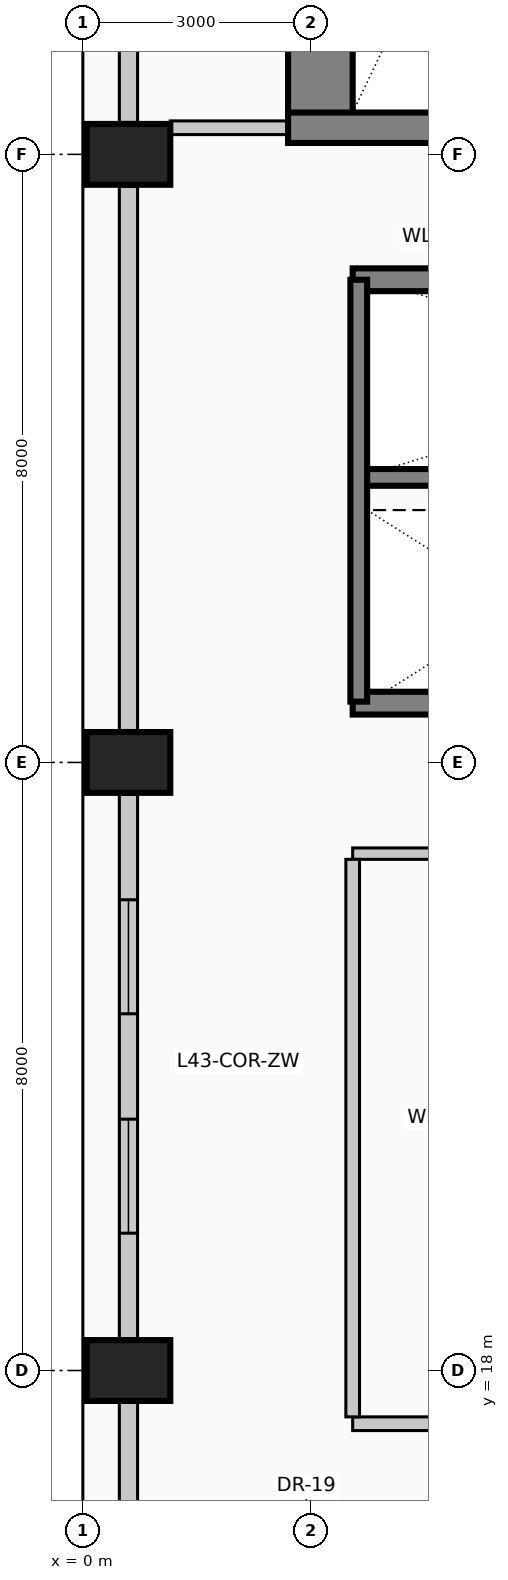
"""IFC4 building model, lengths in metres.
Left out: names, types, materials, properties, quantities, classifications, styles, units other than length and angle.
Written with IfcOpenShell. Run it as: python <this file> out.ifc"""

import sys

from ifc_helpers import new_model, si_unit, direction, frame, frame_2d, origin, origin_2d, place, context, subcontext, project, spatial, rectangle, extrude, element, fill, save


model = new_model("IFC4")
c1 = context("Model", 3, precision=1e-05, world=origin(), true_north=direction((0.0, 1.0)))
c2 = subcontext(c1, "Body", "Model", "MODEL_VIEW")
j1 = project(units=[si_unit("LENGTHUNIT", "METRE"), si_unit("PLANEANGLEUNIT", "RADIAN")], contexts=[c1])
p1 = place(None, origin())
s1 = spatial("IfcSite", under=j1, at=p1, CompositionType="ELEMENT")
p2 = place(p1, origin())
s2 = spatial("IfcBuilding", under=s1, at=p2, CompositionType="ELEMENT")
p3 = place(p2, frame((0.0, 0.0, 178.6)))
s3 = spatial("IfcBuildingStorey", under=s2, at=p3, CompositionType="ELEMENT", Elevation=178.6)
p4 = place(p3, frame((3.125, 34.15, 0.0), z_axis=(0.0, 0.0, 1.0), x_axis=(0.0, 1.0, 0.0)))
e1 = element("IfcWall", 1, at=p4, inside=s3, PredefinedType="SHEAR", context=c2, shape_type="SweptSolid", body=[
    extrude(rectangle(XDim=9.13, YDim=0.85, at=frame_2d((4.565, 0.0))), origin(), (0.0, 0.0, 1.0), 4.0),
])
p5 = place(p3, frame((2.7, 34.35, 0.0), z_axis=(0.0, 0.0, 1.0), x_axis=(1.0, 0.0, 0.0)))
e2 = element("IfcWall", 2, at=p5, inside=s3, PredefinedType="SHEAR", context=c2, shape_type="SweptSolid", body=[
    extrude(rectangle(XDim=5.01, YDim=0.4, at=frame_2d((2.505, 0.0))), origin(), (0.0, 0.0, 1.0), 4.0),
])
p6 = place(p5, frame((2.4, 0.0, 0.0)))
e3 = element("IfcOpeningElement", 3, at=p6, cuts=e2, PredefinedType="OPENING", context=c2, shape_type="SweptSolid", body=[
    extrude(rectangle(XDim=1.15, YDim=2.2, at=frame_2d((0.575, 1.1))), frame((0.0, 0.21, 0.0), z_axis=(0.0, -1.0, 0.0), x_axis=(1.0, 0.0, 0.0)), (0.0, 0.0, 1.0), 0.42),
])
for number, where, z_axis, x_axis in (
    (4, (0.6, 18.0, 0.0), (0.0, 0.0, 1.0), (0.0, 1.0, 0.0)),
    (5, (0.6, 26.0, 0.0), (0.0, 0.0, 1.0), (0.0, 1.0, 0.0)),
    (6, (0.6, 34.0, 0.0), (0.0, 0.0, 1.0), (0.0, 1.0, 0.0)),
):
    element("IfcColumn", number, at=place(p3, frame(where, z_axis=z_axis, x_axis=x_axis)), inside=s3, PredefinedType="COLUMN", context=c2, shape_type="SweptSolid", body=[
        extrude(rectangle(XDim=0.8, YDim=1.1, at=origin_2d()), origin(), (0.0, 0.0, 1.0), 4.0),
    ])
p7 = place(p3, frame((0.6, 10.42, 0.0), z_axis=(0.0, 0.0, 1.0), x_axis=(0.0, 1.0, 0.0)))
e7 = element("IfcWall", 7, at=p7, inside=s3, PredefinedType="SOLIDWALL", context=c2, shape_type="SweptSolid", body=[
    extrude(rectangle(XDim=7.16, YDim=0.24, at=frame_2d((3.58, 0.0))), origin(), (0.0, 0.0, 1.0), 3.0),
])
p8 = place(p7, frame((1.387, 0.0, 0.42)))
e8 = element("IfcOpeningElement", 8, at=p8, cuts=e7, PredefinedType="OPENING", context=c2, shape_type="SweptSolid", body=[
    extrude(rectangle(XDim=1.5, YDim=2.2, at=frame_2d((0.75, 1.1))), frame((0.0, 0.13, 0.0), z_axis=(0.0, -1.0, 0.0), x_axis=(1.0, 0.0, 0.0)), (0.0, 0.0, 1.0), 0.26),
])
p9 = place(p3, frame((0.6, 18.42, 0.0), z_axis=(0.0, 0.0, 1.0), x_axis=(0.0, 1.0, 0.0)))
e9 = element("IfcWall", 9, at=p9, inside=s3, PredefinedType="SOLIDWALL", context=c2, shape_type="SweptSolid", body=[
    extrude(rectangle(XDim=7.16, YDim=0.24, at=frame_2d((3.58, 0.0))), origin(), (0.0, 0.0, 1.0), 3.0),
])
p10 = place(p9, frame((1.387, 0.0, 0.42)))
e10 = element("IfcOpeningElement", 10, at=p10, cuts=e9, PredefinedType="OPENING", context=c2, shape_type="SweptSolid", body=[
    extrude(rectangle(XDim=1.5, YDim=2.2, at=frame_2d((0.75, 1.1))), frame((0.0, 0.13, 0.0), z_axis=(0.0, -1.0, 0.0), x_axis=(1.0, 0.0, 0.0)), (0.0, 0.0, 1.0), 0.26),
])
p11 = place(p9, frame((4.273, 0.0, 0.42)))
e11 = element("IfcOpeningElement", 11, at=p11, cuts=e9, PredefinedType="OPENING", context=c2, shape_type="SweptSolid", body=[
    extrude(rectangle(XDim=1.5, YDim=2.2, at=frame_2d((0.75, 1.1))), frame((0.0, 0.13, 0.0), z_axis=(0.0, -1.0, 0.0), x_axis=(1.0, 0.0, 0.0)), (0.0, 0.0, 1.0), 0.26),
])
p12 = place(p3, frame((0.6, 26.42, 0.0), z_axis=(0.0, 0.0, 1.0), x_axis=(0.0, 1.0, 0.0)))
e12 = element("IfcWall", 12, at=p12, inside=s3, PredefinedType="SOLIDWALL", context=c2, shape_type="SweptSolid", body=[
    extrude(rectangle(XDim=7.16, YDim=0.24, at=frame_2d((3.58, 0.0))), origin(), (0.0, 0.0, 1.0), 3.0),
])
p13 = place(p3, frame((0.6, 34.42, 0.0), z_axis=(0.0, 0.0, 1.0), x_axis=(0.0, 1.0, 0.0)))
e13 = element("IfcWall", 13, at=p13, inside=s3, PredefinedType="SOLIDWALL", context=c2, shape_type="SweptSolid", body=[
    extrude(rectangle(XDim=7.56, YDim=0.24, at=frame_2d((3.78, 0.0))), origin(), (0.0, 0.0, 1.0), 3.0),
])
for number, where, z_axis, x_axis in (
    (14, (3.55, 32.35, 0.0), (0.0, 0.0, 1.0), (1.0, 0.0, 0.0)),
    (15, (5.65, 26.78, 0.0), (0.0, 0.0, 1.0), (-1.0, 0.0, 0.0)),
):
    element("IfcWall", number, at=place(p3, frame(where, z_axis=z_axis, x_axis=x_axis)), inside=s3, PredefinedType="SOLIDWALL", context=c2, shape_type="SweptSolid", body=[
        extrude(rectangle(XDim=2.1, YDim=0.3, at=frame_2d((1.05, 0.0))), origin(), (0.0, 0.0, 1.0), 4.0),
    ])
p14 = place(p3, frame((3.55, 29.75, 0.0), z_axis=(0.0, 0.0, 1.0), x_axis=(1.0, 0.0, 0.0)))
e16 = element("IfcWall", 16, at=p14, inside=s3, PredefinedType="SOLIDWALL", context=c2, shape_type="SweptSolid", body=[
    extrude(rectangle(XDim=8.65, YDim=0.22, at=frame_2d((4.325, 0.0))), origin(), (0.0, 0.0, 1.0), 4.0),
])
p15 = place(p3, frame((3.63, 26.8, 0.0), z_axis=(0.0, 0.0, 1.0), x_axis=(0.0, 1.0, 0.0)))
e17 = element("IfcWall", 17, at=p15, inside=s3, PredefinedType="SOLIDWALL", context=c2, shape_type="SweptSolid", body=[
    extrude(rectangle(XDim=5.55, YDim=0.22, at=frame_2d((2.775, 0.0))), origin(), (0.0, 0.0, 1.0), 4.0),
])
p16 = place(p3, frame((3.55, 17.3, 0.0), z_axis=(0.0, 0.0, 1.0), x_axis=(1.0, 0.0, 0.0)))
e18 = element("IfcWall", 18, at=p16, inside=s3, PredefinedType="PARTITIONING", context=c2, shape_type="SweptSolid", body=[
    extrude(rectangle(XDim=6.25, YDim=0.18, at=frame_2d((3.125, 0.0))), origin(), (0.0, 0.0, 1.0), 3.75),
])
p17 = place(p16, frame((2.6, 0.0, 0.0)))
e19 = element("IfcOpeningElement", 19, at=p17, cuts=e18, PredefinedType="OPENING", context=c2, shape_type="SweptSolid", body=[
    extrude(rectangle(XDim=1.05, YDim=2.15, at=frame_2d((0.525, 1.075))), frame((0.0, 0.1, 0.0), z_axis=(0.0, -1.0, 0.0), x_axis=(1.0, 0.0, 0.0)), (0.0, 0.0, 1.0), 0.2),
])
p18 = place(p3, frame((3.55, 24.8, 0.0), z_axis=(0.0, 0.0, 1.0), x_axis=(1.0, 0.0, 0.0)))
e20 = element("IfcWall", 20, at=p18, inside=s3, PredefinedType="PARTITIONING", context=c2, shape_type="SweptSolid", body=[
    extrude(rectangle(XDim=6.25, YDim=0.15, at=frame_2d((3.125, 0.0))), origin(), (0.0, 0.0, 1.0), 3.75),
])
p19 = place(p3, frame((1.15, 34.35, 0.0), z_axis=(0.0, 0.0, 1.0), x_axis=(1.0, 0.0, 0.0)))
e21 = element("IfcWall", 21, at=p19, inside=s3, PredefinedType="PARTITIONING", context=c2, shape_type="SweptSolid", body=[
    extrude(rectangle(XDim=1.55, YDim=0.18, at=frame_2d((0.775, 0.0))), origin(), (0.0, 0.0, 1.0), 3.75),
])
p20 = place(p3, frame((3.55, 17.39, 0.0), z_axis=(0.0, 0.0, 1.0), x_axis=(0.0, 1.0, 0.0)))
e22 = element("IfcWall", 22, at=p20, inside=s3, PredefinedType="PARTITIONING", context=c2, shape_type="SweptSolid", body=[
    extrude(rectangle(XDim=7.335, YDim=0.18, at=frame_2d((3.667, 0.0))), origin(), (0.0, 0.0, 1.0), 3.75),
])
p21 = place(p10, origin())
e23 = element("IfcWindow", 23, at=p21, inside=s3, PartitioningType="SINGLE_PANEL", PredefinedType="WINDOW", context=c2, shape_type="SweptSolid", body=[
    extrude(rectangle(XDim=1.5, YDim=2.2, at=frame_2d((0.75, 1.1))), frame((0.0, 0.03, 0.0), z_axis=(0.0, -1.0, 0.0), x_axis=(1.0, 0.0, 0.0)), (0.0, 0.0, 1.0), 0.06),
])
fill(e10, e23)
p22 = place(p11, origin())
e24 = element("IfcWindow", 24, at=p22, inside=s3, PartitioningType="SINGLE_PANEL", PredefinedType="WINDOW", context=c2, shape_type="SweptSolid", body=[
    extrude(rectangle(XDim=1.5, YDim=2.2, at=frame_2d((0.75, 1.1))), frame((0.0, 0.03, 0.0), z_axis=(0.0, -1.0, 0.0), x_axis=(1.0, 0.0, 0.0)), (0.0, 0.0, 1.0), 0.06),
])
fill(e11, e24)
save(model, sys.argv[1])
